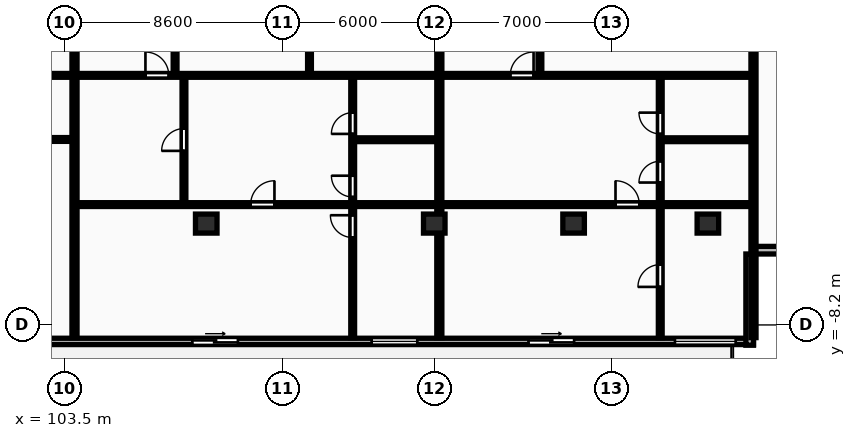
"""IFC4 building model, lengths in metres.
Left out: names, types, materials, properties, quantities, classifications, styles, units other than length and angle.
Written with IfcOpenShell. Run it as: python <this file> out.ifc"""

import sys

from ifc_helpers import new_model, si_unit, direction, frame, frame_2d, origin, origin_2d, place, context, subcontext, project, spatial, rectangle, extrude, element, fill, save


model = new_model("IFC4")
c1 = context("Model", 3, precision=1e-05, world=origin(), true_north=direction((0.0, 1.0)))
c2 = subcontext(c1, "Body", "Model", "MODEL_VIEW")
j1 = project(units=[si_unit("LENGTHUNIT", "METRE"), si_unit("PLANEANGLEUNIT", "RADIAN")], contexts=[c1])
p1 = place(None, origin())
s1 = spatial("IfcSite", under=j1, at=p1, CompositionType="ELEMENT")
p2 = place(p1, origin())
s2 = spatial("IfcBuilding", under=s1, at=p2, CompositionType="ELEMENT")
p3 = place(p2, frame((0.0, 0.0, 87.3)))
s3 = spatial("IfcBuildingStorey", under=s2, at=p3, CompositionType="ELEMENT", Elevation=87.3)
for number, where, z_axis, x_axis in (
    (1, (109.1, -4.2, 0.0), (0.0, 0.0, 1.0), (1.0, 0.0, 0.0)),
    (2, (118.1, -4.2, 0.0), (0.0, 0.0, 1.0), (1.0, 0.0, 0.0)),
    (3, (123.6, -4.2, 0.0), (0.0, 0.0, 1.0), (1.0, 0.0, 0.0)),
    (4, (128.9, -4.2, 0.0), (0.0, 0.0, 1.0), (1.0, 0.0, 0.0)),
):
    element("IfcColumn", number, at=place(p3, frame(where, z_axis=z_axis, x_axis=x_axis)), inside=s3, PredefinedType="COLUMN", context=c2, shape_type="SweptSolid", body=[
        extrude(rectangle(XDim=0.85, YDim=0.75, at=origin_2d()), origin(), (0.0, 0.0, 1.0), 3.25),
    ])
p4 = place(p3, frame((72.7, -8.85, 0.0), z_axis=(0.0, 0.0, 1.0), x_axis=(1.0, 0.0, 0.0)))
e5 = element("IfcWall", 5, at=p4, inside=s3, PredefinedType="STANDARD", context=c2, shape_type="SweptSolid", body=[
    extrude(rectangle(XDim=58.0, YDim=0.25, at=frame_2d((29.0, 0.0))), origin(), (0.0, 0.0, 1.0), 2.97),
])
p5 = place(p4, frame((2.92, 0.0, 0.0)))
e6 = element("IfcOpeningElement", 6, at=p5, cuts=e5, PredefinedType="OPENING", context=c2, shape_type="SweptSolid", body=[
    extrude(rectangle(XDim=1.8, YDim=2.2, at=frame_2d((0.9, 1.1))), frame((0.0, 0.135, 0.0), z_axis=(0.0, -1.0, 0.0), x_axis=(1.0, 0.0, 0.0)), (0.0, 0.0, 1.0), 0.27),
])
p6 = place(p4, frame((9.2, 0.0, 0.85)))
e7 = element("IfcOpeningElement", 7, at=p6, cuts=e5, PredefinedType="OPENING", context=c2, shape_type="SweptSolid", body=[
    extrude(rectangle(XDim=2.4, YDim=1.9, at=frame_2d((1.2, 0.95))), frame((0.0, 0.135, 0.0), z_axis=(0.0, -1.0, 0.0), x_axis=(1.0, 0.0, 0.0)), (0.0, 0.0, 1.0), 0.27),
])
p7 = place(p4, frame((21.7, 0.0, 0.85)))
e8 = element("IfcOpeningElement", 8, at=p7, cuts=e5, PredefinedType="OPENING", context=c2, shape_type="SweptSolid", body=[
    extrude(rectangle(XDim=2.4, YDim=1.9, at=frame_2d((1.2, 0.95))), frame((0.0, 0.135, 0.0), z_axis=(0.0, -1.0, 0.0), x_axis=(1.0, 0.0, 0.0)), (0.0, 0.0, 1.0), 0.27),
])
p8 = place(p4, frame((16.0, 0.0, 0.0)))
e9 = element("IfcOpeningElement", 9, at=p8, cuts=e5, PredefinedType="OPENING", context=c2, shape_type="SweptSolid", body=[
    extrude(rectangle(XDim=1.8, YDim=2.2, at=frame_2d((0.9, 1.1))), frame((0.0, 0.135, 0.0), z_axis=(0.0, -1.0, 0.0), x_axis=(1.0, 0.0, 0.0)), (0.0, 0.0, 1.0), 0.27),
])
p9 = place(p4, frame((27.1, 0.0, 0.85)))
e10 = element("IfcOpeningElement", 10, at=p9, cuts=e5, PredefinedType="OPENING", context=c2, shape_type="SweptSolid", body=[
    extrude(rectangle(XDim=2.4, YDim=1.9, at=frame_2d((1.2, 0.95))), frame((0.0, 0.135, 0.0), z_axis=(0.0, -1.0, 0.0), x_axis=(1.0, 0.0, 0.0)), (0.0, 0.0, 1.0), 0.27),
])
p10 = place(p4, frame((35.85, 0.0, 0.0)))
e11 = element("IfcOpeningElement", 11, at=p10, cuts=e5, PredefinedType="OPENING", context=c2, shape_type="SweptSolid", body=[
    extrude(rectangle(XDim=1.8, YDim=2.2, at=frame_2d((0.9, 1.1))), frame((0.0, 0.135, 0.0), z_axis=(0.0, -1.0, 0.0), x_axis=(1.0, 0.0, 0.0)), (0.0, 0.0, 1.0), 0.27),
])
p11 = place(p4, frame((42.93, 0.0, 0.85)))
e12 = element("IfcOpeningElement", 12, at=p11, cuts=e5, PredefinedType="OPENING", context=c2, shape_type="SweptSolid", body=[
    extrude(rectangle(XDim=1.8, YDim=1.8, at=frame_2d((0.9, 0.9))), frame((0.0, 0.135, 0.0), z_axis=(0.0, -1.0, 0.0), x_axis=(1.0, 0.0, 0.0)), (0.0, 0.0, 1.0), 0.27),
])
p12 = place(p4, frame((49.12, 0.0, 0.0)))
e13 = element("IfcOpeningElement", 13, at=p12, cuts=e5, PredefinedType="OPENING", context=c2, shape_type="SweptSolid", body=[
    extrude(rectangle(XDim=1.8, YDim=2.2, at=frame_2d((0.9, 1.1))), frame((0.0, 0.135, 0.0), z_axis=(0.0, -1.0, 0.0), x_axis=(1.0, 0.0, 0.0)), (0.0, 0.0, 1.0), 0.27),
])
p13 = place(p4, frame((54.9, 0.0, 0.85)))
e14 = element("IfcOpeningElement", 14, at=p13, cuts=e5, PredefinedType="OPENING", context=c2, shape_type="SweptSolid", body=[
    extrude(rectangle(XDim=2.4, YDim=1.9, at=frame_2d((1.2, 0.95))), frame((0.0, 0.135, 0.0), z_axis=(0.0, -1.0, 0.0), x_axis=(1.0, 0.0, 0.0)), (0.0, 0.0, 1.0), 0.27),
])
for number, where, z_axis, x_axis in (
    (15, (130.55, -9.0, 0.0), (0.0, 0.0, 1.0), (0.0, 1.0, 0.0)),
    (16, (130.7, -5.25, 0.0), (0.0, 0.0, 1.0), (1.0, 0.0, 0.0)),
):
    element("IfcWall", number, at=place(p3, frame(where, z_axis=z_axis, x_axis=x_axis)), inside=s3, PredefinedType="STANDARD", context=c2, shape_type="SweptSolid", body=[
        extrude(rectangle(XDim=3.6, YDim=0.3, at=frame_2d((1.8, 0.0))), origin(), (0.0, 0.0, 1.0), 2.97),
    ])
for number, where, z_axis, x_axis in (
    (17, (130.7, -8.7, 0.0), (0.0, 0.0, 1.0), (0.0, 1.0, 0.0)),
    (18, (103.9, -8.7, 0.0), (0.0, 0.0, 1.0), (0.0, 1.0, 0.0)),
):
    element("IfcWall", number, at=place(p3, frame(where, z_axis=z_axis, x_axis=x_axis)), inside=s3, PredefinedType="PARTITIONING", context=c2, shape_type="SweptSolid", body=[
        extrude(rectangle(XDim=24.87, YDim=0.2, at=frame_2d((12.435, 0.0))), origin(), (0.0, 0.0, 1.0), 2.97),
    ])
p14 = place(p3, frame((93.02, -0.88, 0.0), z_axis=(0.0, 0.0, 1.0), x_axis=(1.0, 0.0, 0.0)))
e19 = element("IfcWall", 19, at=p14, inside=s3, PredefinedType="PARTITIONING", context=c2, shape_type="SweptSolid", body=[
    extrude(rectangle(XDim=10.8, YDim=0.15, at=frame_2d((5.4, 0.0))), origin(), (0.0, 0.0, 1.0), 2.97),
])
p15 = place(p14, frame((4.11, 0.0, 0.0)))
e20 = element("IfcOpeningElement", 20, at=p15, cuts=e19, PredefinedType="OPENING", context=c2, shape_type="SweptSolid", body=[
    extrude(rectangle(XDim=0.84, YDim=2.04, at=frame_2d((0.42, 1.02))), frame((0.0, 0.085, 0.0), z_axis=(0.0, -1.0, 0.0), x_axis=(1.0, 0.0, 0.0)), (0.0, 0.0, 1.0), 0.17),
])
p16 = place(p14, frame((5.45, 0.0, 0.0)))
e21 = element("IfcOpeningElement", 21, at=p16, cuts=e19, PredefinedType="OPENING", context=c2, shape_type="SweptSolid", body=[
    extrude(rectangle(XDim=0.84, YDim=2.04, at=frame_2d((0.42, 1.02))), frame((0.0, 0.085, 0.0), z_axis=(0.0, -1.0, 0.0), x_axis=(1.0, 0.0, 0.0)), (0.0, 0.0, 1.0), 0.17),
])
p17 = place(p3, frame((86.18, 1.65, 0.0), z_axis=(0.0, 0.0, 1.0), x_axis=(1.0, 0.0, 0.0)))
e22 = element("IfcWall", 22, at=p17, inside=s3, PredefinedType="PARTITIONING", context=c2, shape_type="SweptSolid", body=[
    extrude(rectangle(XDim=17.64, YDim=0.15, at=frame_2d((8.82, 0.0))), origin(), (0.0, 0.0, 1.0), 2.97),
])
p18 = place(p17, frame((2.72, 0.0, 0.0)))
e23 = element("IfcOpeningElement", 23, at=p18, cuts=e22, PredefinedType="OPENING", context=c2, shape_type="SweptSolid", body=[
    extrude(rectangle(XDim=0.92, YDim=2.08, at=frame_2d((0.46, 1.04))), frame((0.0, 0.085, 0.0), z_axis=(0.0, -1.0, 0.0), x_axis=(1.0, 0.0, 0.0)), (0.0, 0.0, 1.0), 0.17),
])
p19 = place(p3, frame((118.3, -8.7, 0.0), z_axis=(0.0, 0.0, 1.0), x_axis=(0.0, 1.0, 0.0)))
e24 = element("IfcWall", 24, at=p19, inside=s3, PredefinedType="PARTITIONING", context=c2, shape_type="SweptSolid", body=[
    extrude(rectangle(XDim=24.87, YDim=0.2, at=frame_2d((12.435, 0.0))), origin(), (0.0, 0.0, 1.0), 2.2),
])
p20 = place(p3, frame((113.175, 1.69, 0.0), z_axis=(0.0, 0.0, 1.0), x_axis=(0.0, 1.0, 0.0)))
e25 = element("IfcWall", 25, at=p20, inside=s3, PredefinedType="PARTITIONING", context=c2, shape_type="SweptSolid", body=[
    extrude(rectangle(XDim=7.07, YDim=0.15, at=frame_2d((3.535, 0.0))), origin(), (0.0, 0.0, 1.0), 2.97),
])
p21 = place(p20, frame((3.115, 0.0, 0.0)))
e26 = element("IfcOpeningElement", 26, at=p21, cuts=e25, PredefinedType="OPENING", context=c2, shape_type="SweptSolid", body=[
    extrude(rectangle(XDim=0.84, YDim=2.04, at=frame_2d((0.42, 1.02))), frame((0.0, 0.085, 0.0), z_axis=(0.0, -1.0, 0.0), x_axis=(1.0, 0.0, 0.0)), (0.0, 0.0, 1.0), 0.17),
])
p22 = place(p3, frame((107.87, 1.69, 0.0), z_axis=(0.0, 0.0, 1.0), x_axis=(0.0, 1.0, 0.0)))
e27 = element("IfcWall", 27, at=p22, inside=s3, PredefinedType="PARTITIONING", context=c2, shape_type="SweptSolid", body=[
    extrude(rectangle(XDim=14.5, YDim=0.15, at=frame_2d((7.25, 0.0))), origin(), (0.0, 0.0, 1.0), 2.97),
])
p23 = place(p22, frame((2.586, 0.0, 0.0)))
e28 = element("IfcOpeningElement", 28, at=p23, cuts=e27, PredefinedType="OPENING", context=c2, shape_type="SweptSolid", body=[
    extrude(rectangle(XDim=0.88, YDim=2.06, at=frame_2d((0.44, 1.03))), frame((0.0, 0.085, 0.0), z_axis=(0.0, -1.0, 0.0), x_axis=(1.0, 0.0, 0.0)), (0.0, 0.0, 1.0), 0.17),
])
p24 = place(p3, frame((108.22, -3.39, 0.0), z_axis=(0.0, 0.0, 1.0), x_axis=(0.0, 1.0, 0.0)))
e29 = element("IfcWall", 29, at=p24, inside=s3, PredefinedType="PARTITIONING", context=c2, shape_type="SweptSolid", body=[
    extrude(rectangle(XDim=5.0, YDim=0.15, at=frame_2d((2.5, 0.0))), origin(), (0.0, 0.0, 1.0), 2.97),
])
p25 = place(p24, frame((2.06, 0.0, 0.0)))
e30 = element("IfcOpeningElement", 30, at=p25, cuts=e29, PredefinedType="OPENING", context=c2, shape_type="SweptSolid", body=[
    extrude(rectangle(XDim=0.88, YDim=2.06, at=frame_2d((0.44, 1.03))), frame((0.0, 0.085, 0.0), z_axis=(0.0, -1.0, 0.0), x_axis=(1.0, 0.0, 0.0)), (0.0, 0.0, 1.0), 0.17),
])
p26 = place(p3, frame((114.94, -0.89, 0.0), z_axis=(0.0, 0.0, 1.0), x_axis=(1.0, 0.0, 0.0)))
e31 = element("IfcWall", 31, at=p26, inside=s3, PredefinedType="PARTITIONING", context=c2, shape_type="SweptSolid", body=[
    extrude(rectangle(XDim=3.28, YDim=0.15, at=frame_2d((1.64, 0.0))), origin(), (0.0, 0.0, 1.0), 2.97),
])
p27 = place(p3, frame((114.88, -8.7, 0.0), z_axis=(0.0, 0.0, 1.0), x_axis=(0.0, 1.0, 0.0)))
e32 = element("IfcWall", 32, at=p27, inside=s3, PredefinedType="PARTITIONING", context=c2, shape_type="SweptSolid", body=[
    extrude(rectangle(XDim=10.31, YDim=0.15, at=frame_2d((5.155, 0.0))), origin(), (0.0, 0.0, 1.0), 2.97),
])
p28 = place(p27, frame((5.55, 0.0, 0.0)))
e33 = element("IfcOpeningElement", 33, at=p28, cuts=e32, PredefinedType="OPENING", context=c2, shape_type="SweptSolid", body=[
    extrude(rectangle(XDim=0.84, YDim=2.04, at=frame_2d((0.42, 1.02))), frame((0.0, 0.085, 0.0), z_axis=(0.0, -1.0, 0.0), x_axis=(1.0, 0.0, 0.0)), (0.0, 0.0, 1.0), 0.17),
])
p29 = place(p27, frame((8.04, 0.0, 0.0)))
e34 = element("IfcOpeningElement", 34, at=p29, cuts=e32, PredefinedType="OPENING", context=c2, shape_type="SweptSolid", body=[
    extrude(rectangle(XDim=0.84, YDim=2.04, at=frame_2d((0.42, 1.02))), frame((0.0, 0.085, 0.0), z_axis=(0.0, -1.0, 0.0), x_axis=(1.0, 0.0, 0.0)), (0.0, 0.0, 1.0), 0.17),
])
p30 = place(p27, frame((3.95, 0.0, 0.0)))
e35 = element("IfcOpeningElement", 35, at=p30, cuts=e32, PredefinedType="OPENING", context=c2, shape_type="SweptSolid", body=[
    extrude(rectangle(XDim=0.88, YDim=2.06, at=frame_2d((0.44, 1.03))), frame((0.0, 0.085, 0.0), z_axis=(0.0, -1.0, 0.0), x_axis=(1.0, 0.0, 0.0)), (0.0, 0.0, 1.0), 0.17),
])
p31 = place(p3, frame((103.98, 1.65, 0.0), z_axis=(0.0, 0.0, 1.0), x_axis=(1.0, 0.0, 0.0)))
e36 = element("IfcWall", 36, at=p31, inside=s3, PredefinedType="PARTITIONING", context=c2, shape_type="SweptSolid", body=[
    extrude(rectangle(XDim=14.24, YDim=0.15, at=frame_2d((7.12, 0.0))), origin(), (0.0, 0.0, 1.0), 2.97),
])
p32 = place(p31, frame((2.72, 0.0, 0.0)))
e37 = element("IfcOpeningElement", 37, at=p32, cuts=e36, PredefinedType="OPENING", context=c2, shape_type="SweptSolid", body=[
    extrude(rectangle(XDim=0.92, YDim=2.08, at=frame_2d((0.46, 1.04))), frame((0.0, 0.085, 0.0), z_axis=(0.0, -1.0, 0.0), x_axis=(1.0, 0.0, 0.0)), (0.0, 0.0, 1.0), 0.17),
])
p33 = place(p3, frame((103.98, -3.45, 0.0), z_axis=(0.0, 0.0, 1.0), x_axis=(1.0, 0.0, 0.0)))
e38 = element("IfcWall", 38, at=p33, inside=s3, PredefinedType="PARTITIONING", context=c2, shape_type="SweptSolid", body=[
    extrude(rectangle(XDim=14.24, YDim=0.15, at=frame_2d((7.12, 0.0))), origin(), (0.0, 0.0, 1.0), 2.97),
])
p34 = place(p33, frame((6.872, 0.0, 0.0)))
e39 = element("IfcOpeningElement", 39, at=p34, cuts=e38, PredefinedType="OPENING", context=c2, shape_type="SweptSolid", body=[
    extrude(rectangle(XDim=0.94, YDim=2.1, at=frame_2d((0.47, 1.05))), frame((0.0, 0.085, 0.0), z_axis=(0.0, -1.0, 0.0), x_axis=(1.0, 0.0, 0.0)), (0.0, 0.0, 1.0), 0.17),
])
p35 = place(p3, frame((122.27, 1.69, 0.0), z_axis=(0.0, 0.0, 1.0), x_axis=(0.0, 1.0, 0.0)))
e40 = element("IfcWall", 40, at=p35, inside=s3, PredefinedType="PARTITIONING", context=c2, shape_type="SweptSolid", body=[
    extrude(rectangle(XDim=14.5, YDim=0.15, at=frame_2d((7.25, 0.0))), origin(), (0.0, 0.0, 1.0), 2.97),
])
p36 = place(p35, frame((2.542, 0.0, 0.0)))
e41 = element("IfcOpeningElement", 41, at=p36, cuts=e40, PredefinedType="OPENING", context=c2, shape_type="SweptSolid", body=[
    extrude(rectangle(XDim=0.88, YDim=2.06, at=frame_2d((0.44, 1.03))), frame((0.0, 0.085, 0.0), z_axis=(0.0, -1.0, 0.0), x_axis=(1.0, 0.0, 0.0)), (0.0, 0.0, 1.0), 0.17),
])
p37 = place(p3, frame((127.08, -0.89, 0.0), z_axis=(0.0, 0.0, 1.0), x_axis=(1.0, 0.0, 0.0)))
e42 = element("IfcWall", 42, at=p37, inside=s3, PredefinedType="PARTITIONING", context=c2, shape_type="SweptSolid", body=[
    extrude(rectangle(XDim=3.54, YDim=0.15, at=frame_2d((1.77, 0.0))), origin(), (0.0, 0.0, 1.0), 2.97),
])
p38 = place(p3, frame((127.02, -8.7, 0.0), z_axis=(0.0, 0.0, 1.0), x_axis=(0.0, 1.0, 0.0)))
e43 = element("IfcWall", 43, at=p38, inside=s3, PredefinedType="PARTITIONING", context=c2, shape_type="SweptSolid", body=[
    extrude(rectangle(XDim=10.31, YDim=0.15, at=frame_2d((5.155, 0.0))), origin(), (0.0, 0.0, 1.0), 2.97),
])
p39 = place(p38, frame((6.12, 0.0, 0.0)))
e44 = element("IfcOpeningElement", 44, at=p39, cuts=e43, PredefinedType="OPENING", context=c2, shape_type="SweptSolid", body=[
    extrude(rectangle(XDim=0.84, YDim=2.04, at=frame_2d((0.42, 1.02))), frame((0.0, 0.085, 0.0), z_axis=(0.0, -1.0, 0.0), x_axis=(1.0, 0.0, 0.0)), (0.0, 0.0, 1.0), 0.17),
])
p40 = place(p38, frame((8.04, 0.0, 0.0)))
e45 = element("IfcOpeningElement", 45, at=p40, cuts=e43, PredefinedType="OPENING", context=c2, shape_type="SweptSolid", body=[
    extrude(rectangle(XDim=0.84, YDim=2.04, at=frame_2d((0.42, 1.02))), frame((0.0, 0.085, 0.0), z_axis=(0.0, -1.0, 0.0), x_axis=(1.0, 0.0, 0.0)), (0.0, 0.0, 1.0), 0.17),
])
p41 = place(p38, frame((2.001, 0.0, 0.0)))
e46 = element("IfcOpeningElement", 46, at=p41, cuts=e43, PredefinedType="OPENING", context=c2, shape_type="SweptSolid", body=[
    extrude(rectangle(XDim=0.88, YDim=2.06, at=frame_2d((0.44, 1.03))), frame((0.0, 0.085, 0.0), z_axis=(0.0, -1.0, 0.0), x_axis=(1.0, 0.0, 0.0)), (0.0, 0.0, 1.0), 0.17),
])
p42 = place(p3, frame((118.38, 1.65, 0.0), z_axis=(0.0, 0.0, 1.0), x_axis=(1.0, 0.0, 0.0)))
e47 = element("IfcWall", 47, at=p42, inside=s3, PredefinedType="PARTITIONING", context=c2, shape_type="SweptSolid", body=[
    extrude(rectangle(XDim=12.24, YDim=0.15, at=frame_2d((6.12, 0.0))), origin(), (0.0, 0.0, 1.0), 2.97),
])
p43 = place(p42, frame((2.72, 0.0, 0.0)))
e48 = element("IfcOpeningElement", 48, at=p43, cuts=e47, PredefinedType="OPENING", context=c2, shape_type="SweptSolid", body=[
    extrude(rectangle(XDim=0.92, YDim=2.08, at=frame_2d((0.46, 1.04))), frame((0.0, 0.085, 0.0), z_axis=(0.0, -1.0, 0.0), x_axis=(1.0, 0.0, 0.0)), (0.0, 0.0, 1.0), 0.17),
])
p44 = place(p3, frame((118.38, -3.45, 0.0), z_axis=(0.0, 0.0, 1.0), x_axis=(1.0, 0.0, 0.0)))
e49 = element("IfcWall", 49, at=p44, inside=s3, PredefinedType="PARTITIONING", context=c2, shape_type="SweptSolid", body=[
    extrude(rectangle(XDim=12.24, YDim=0.15, at=frame_2d((6.12, 0.0))), origin(), (0.0, 0.0, 1.0), 2.97),
])
p45 = place(p44, frame((6.874, 0.0, 0.0)))
e50 = element("IfcOpeningElement", 50, at=p45, cuts=e49, PredefinedType="OPENING", context=c2, shape_type="SweptSolid", body=[
    extrude(rectangle(XDim=0.94, YDim=2.1, at=frame_2d((0.47, 1.05))), frame((0.0, 0.085, 0.0), z_axis=(0.0, -1.0, 0.0), x_axis=(1.0, 0.0, 0.0)), (0.0, 0.0, 1.0), 0.17),
])
p46 = place(p10, origin())
e51 = element("IfcDoor", 51, at=p46, inside=s3, OperationType="SLIDING_TO_RIGHT", PredefinedType="DOOR", context=c2, shape_type="SweptSolid", body=[
    extrude(rectangle(XDim=1.8, YDim=2.2, at=frame_2d((0.9, 1.1))), frame((0.0, 0.025, 0.0), z_axis=(0.0, -1.0, 0.0), x_axis=(1.0, 0.0, 0.0)), (0.0, 0.0, 1.0), 0.05),
])
fill(e11, e51)
p47 = place(p11, origin())
e52 = element("IfcWindow", 52, at=p47, inside=s3, PartitioningType="SINGLE_PANEL", PredefinedType="WINDOW", context=c2, shape_type="SweptSolid", body=[
    extrude(rectangle(XDim=1.8, YDim=1.8, at=frame_2d((0.9, 0.9))), frame((0.0, 0.03, 0.0), z_axis=(0.0, -1.0, 0.0), x_axis=(1.0, 0.0, 0.0)), (0.0, 0.0, 1.0), 0.06),
])
fill(e12, e52)
p48 = place(p12, origin())
e53 = element("IfcDoor", 53, at=p48, inside=s3, OperationType="SLIDING_TO_RIGHT", PredefinedType="DOOR", context=c2, shape_type="SweptSolid", body=[
    extrude(rectangle(XDim=1.8, YDim=2.2, at=frame_2d((0.9, 1.1))), frame((0.0, 0.025, 0.0), z_axis=(0.0, -1.0, 0.0), x_axis=(1.0, 0.0, 0.0)), (0.0, 0.0, 1.0), 0.05),
])
fill(e13, e53)
p49 = place(p13, origin())
e54 = element("IfcWindow", 54, at=p49, inside=s3, PartitioningType="DOUBLE_PANEL_VERTICAL", PredefinedType="WINDOW", context=c2, shape_type="SweptSolid", body=[
    extrude(rectangle(XDim=2.4, YDim=1.9, at=frame_2d((1.2, 0.95))), frame((0.0, 0.03, 0.0), z_axis=(0.0, -1.0, 0.0), x_axis=(1.0, 0.0, 0.0)), (0.0, 0.0, 1.0), 0.06),
])
fill(e14, e54)
p50 = place(p25, origin())
e55 = element("IfcDoor", 55, at=p50, inside=s3, OperationType="SINGLE_SWING_LEFT", PredefinedType="DOOR", context=c2, shape_type="SweptSolid", body=[
    extrude(rectangle(XDim=0.88, YDim=2.06, at=frame_2d((0.44, 1.03))), frame((0.0, 0.025, 0.0), z_axis=(0.0, -1.0, 0.0), x_axis=(1.0, 0.0, 0.0)), (0.0, 0.0, 1.0), 0.05),
])
fill(e30, e55)
p51 = place(p28, origin())
e56 = element("IfcDoor", 56, at=p51, inside=s3, OperationType="SINGLE_SWING_RIGHT", PredefinedType="DOOR", context=c2, shape_type="SweptSolid", body=[
    extrude(rectangle(XDim=0.84, YDim=2.04, at=frame_2d((0.42, 1.02))), frame((0.0, 0.025, 0.0), z_axis=(0.0, -1.0, 0.0), x_axis=(1.0, 0.0, 0.0)), (0.0, 0.0, 1.0), 0.05),
])
fill(e33, e56)
p52 = place(p29, origin())
e57 = element("IfcDoor", 57, at=p52, inside=s3, OperationType="SINGLE_SWING_LEFT", PredefinedType="DOOR", context=c2, shape_type="SweptSolid", body=[
    extrude(rectangle(XDim=0.84, YDim=2.04, at=frame_2d((0.42, 1.02))), frame((0.0, 0.025, 0.0), z_axis=(0.0, -1.0, 0.0), x_axis=(1.0, 0.0, 0.0)), (0.0, 0.0, 1.0), 0.05),
])
fill(e34, e57)
p53 = place(p30, origin())
e58 = element("IfcDoor", 58, at=p53, inside=s3, OperationType="SINGLE_SWING_RIGHT", PredefinedType="DOOR", context=c2, shape_type="SweptSolid", body=[
    extrude(rectangle(XDim=0.88, YDim=2.06, at=frame_2d((0.44, 1.03))), frame((0.0, 0.025, 0.0), z_axis=(0.0, -1.0, 0.0), x_axis=(1.0, 0.0, 0.0)), (0.0, 0.0, 1.0), 0.05),
])
fill(e35, e58)
p54 = place(p32, origin())
e59 = element("IfcDoor", 59, at=p54, inside=s3, OperationType="SINGLE_SWING_LEFT", PredefinedType="DOOR", context=c2, shape_type="SweptSolid", body=[
    extrude(rectangle(XDim=0.92, YDim=2.08, at=frame_2d((0.46, 1.04))), frame((0.0, 0.025, 0.0), z_axis=(0.0, -1.0, 0.0), x_axis=(1.0, 0.0, 0.0)), (0.0, 0.0, 1.0), 0.05),
])
fill(e37, e59)
p55 = place(p34, origin())
e60 = element("IfcDoor", 60, at=p55, inside=s3, OperationType="SINGLE_SWING_RIGHT", PredefinedType="DOOR", context=c2, shape_type="SweptSolid", body=[
    extrude(rectangle(XDim=0.94, YDim=2.1, at=frame_2d((0.47, 1.05))), frame((0.0, 0.025, 0.0), z_axis=(0.0, -1.0, 0.0), x_axis=(1.0, 0.0, 0.0)), (0.0, 0.0, 1.0), 0.05),
])
fill(e39, e60)
p56 = place(p39, origin())
e61 = element("IfcDoor", 61, at=p56, inside=s3, OperationType="SINGLE_SWING_LEFT", PredefinedType="DOOR", context=c2, shape_type="SweptSolid", body=[
    extrude(rectangle(XDim=0.84, YDim=2.04, at=frame_2d((0.42, 1.02))), frame((0.0, 0.025, 0.0), z_axis=(0.0, -1.0, 0.0), x_axis=(1.0, 0.0, 0.0)), (0.0, 0.0, 1.0), 0.05),
])
fill(e44, e61)
p57 = place(p40, origin())
e62 = element("IfcDoor", 62, at=p57, inside=s3, OperationType="SINGLE_SWING_RIGHT", PredefinedType="DOOR", context=c2, shape_type="SweptSolid", body=[
    extrude(rectangle(XDim=0.84, YDim=2.04, at=frame_2d((0.42, 1.02))), frame((0.0, 0.025, 0.0), z_axis=(0.0, -1.0, 0.0), x_axis=(1.0, 0.0, 0.0)), (0.0, 0.0, 1.0), 0.05),
])
fill(e45, e62)
p58 = place(p41, origin())
e63 = element("IfcDoor", 63, at=p58, inside=s3, OperationType="SINGLE_SWING_LEFT", PredefinedType="DOOR", context=c2, shape_type="SweptSolid", body=[
    extrude(rectangle(XDim=0.88, YDim=2.06, at=frame_2d((0.44, 1.03))), frame((0.0, 0.025, 0.0), z_axis=(0.0, -1.0, 0.0), x_axis=(1.0, 0.0, 0.0)), (0.0, 0.0, 1.0), 0.05),
])
fill(e46, e63)
p59 = place(p43, origin())
e64 = element("IfcDoor", 64, at=p59, inside=s3, OperationType="SINGLE_SWING_RIGHT", PredefinedType="DOOR", context=c2, shape_type="SweptSolid", body=[
    extrude(rectangle(XDim=0.92, YDim=2.08, at=frame_2d((0.46, 1.04))), frame((0.0, 0.025, 0.0), z_axis=(0.0, -1.0, 0.0), x_axis=(1.0, 0.0, 0.0)), (0.0, 0.0, 1.0), 0.05),
])
fill(e48, e64)
p60 = place(p45, origin())
e65 = element("IfcDoor", 65, at=p60, inside=s3, OperationType="SINGLE_SWING_LEFT", PredefinedType="DOOR", context=c2, shape_type="SweptSolid", body=[
    extrude(rectangle(XDim=0.94, YDim=2.1, at=frame_2d((0.47, 1.05))), frame((0.0, 0.025, 0.0), z_axis=(0.0, -1.0, 0.0), x_axis=(1.0, 0.0, 0.0)), (0.0, 0.0, 1.0), 0.05),
])
fill(e50, e65)
save(model, sys.argv[1])
